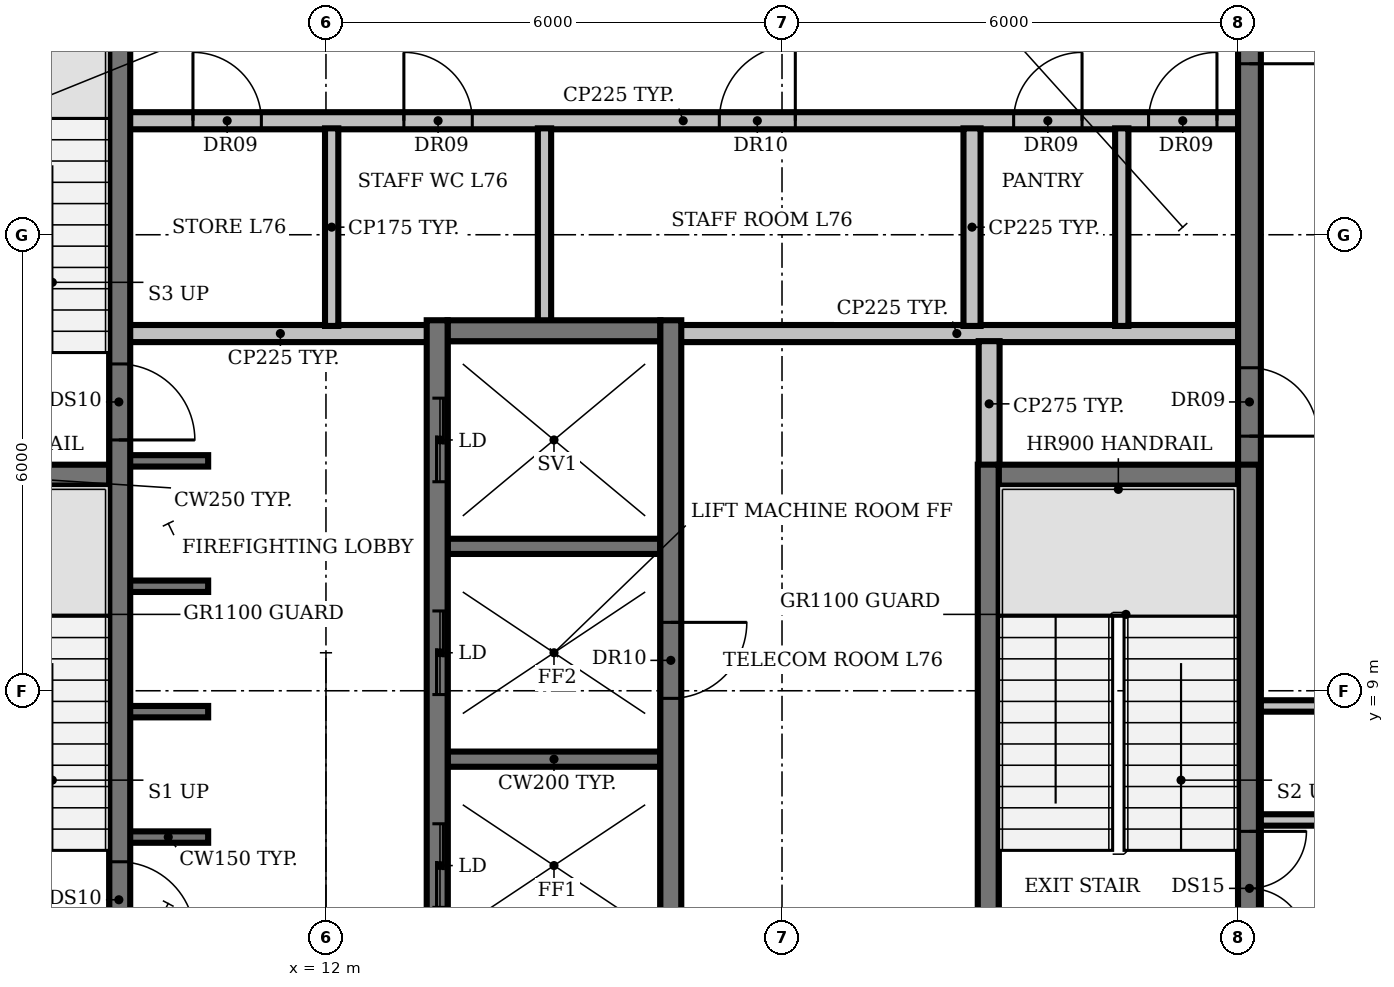
"""IFC4 building model, lengths in metres.
Left out: names, types, materials, properties, quantities, classifications, styles, units other than length and angle.
Written with IfcOpenShell. Run it as: python <this file> out.ifc"""

import sys

from ifc_helpers import new_model, si_unit, direction, frame, frame_2d, origin, place, context, subcontext, project, spatial, rectangle, extrude, element, fill, save


model = new_model("IFC4")
c1 = context("Model", 3, precision=1e-05, world=origin(), true_north=direction((0.0, 1.0)))
c2 = subcontext(c1, "Body", "Model", "MODEL_VIEW")
j1 = project(units=[si_unit("LENGTHUNIT", "METRE"), si_unit("PLANEANGLEUNIT", "RADIAN")], contexts=[c1])
p1 = place(None, origin())
s1 = spatial("IfcSite", under=j1, at=p1, CompositionType="ELEMENT")
p2 = place(p1, origin())
s2 = spatial("IfcBuilding", under=s1, at=p2, CompositionType="ELEMENT")
p3 = place(p2, frame((0.0, 0.0, 339.8)))
s3 = spatial("IfcBuildingStorey", under=s2, at=p3, CompositionType="ELEMENT", Elevation=339.8)
p4 = place(p3, frame((9.4, 7.075, 0.0), z_axis=(0.0, 0.0, 1.0), x_axis=(1.0, 0.0, 0.0)))
e1 = element("IfcWall", 1, at=p4, inside=s3, PredefinedType="SHEAR", context=c2, shape_type="SweptSolid", body=[
    extrude(rectangle(XDim=1.05, YDim=0.15, at=frame_2d((0.525, 0.0))), origin(), (0.0, 0.0, 1.0), 3.9),
])
p5 = place(p3, frame((13.6, 8.1, 0.0), z_axis=(0.0, 0.0, 1.0), x_axis=(1.0, 0.0, 0.0)))
e2 = element("IfcWall", 2, at=p5, inside=s3, PredefinedType="SHEAR", context=c2, shape_type="SweptSolid", body=[
    extrude(rectangle(XDim=2.8, YDim=0.2, at=frame_2d((1.4, 0.0))), origin(), (0.0, 0.0, 1.0), 3.9),
])
for number, where, z_axis, x_axis in (
    (3, (9.4, 8.725, 0.0), (0.0, 0.0, 1.0), (1.0, 0.0, 0.0)),
    (4, (9.4, 10.375, 0.0), (0.0, 0.0, 1.0), (1.0, 0.0, 0.0)),
):
    element("IfcWall", number, at=place(p3, frame(where, z_axis=z_axis, x_axis=x_axis)), inside=s3, PredefinedType="SHEAR", context=c2, shape_type="SweptSolid", body=[
        extrude(rectangle(XDim=1.05, YDim=0.15, at=frame_2d((0.525, 0.0))), origin(), (0.0, 0.0, 1.0), 3.9),
    ])
p6 = place(p3, frame((13.6, 10.9, 0.0), z_axis=(0.0, 0.0, 1.0), x_axis=(1.0, 0.0, 0.0)))
e5 = element("IfcWall", 5, at=p6, inside=s3, PredefinedType="SHEAR", context=c2, shape_type="SweptSolid", body=[
    extrude(rectangle(XDim=2.8, YDim=0.2, at=frame_2d((1.4, 0.0))), origin(), (0.0, 0.0, 1.0), 3.9),
])
for number, where, z_axis, x_axis in (
    (6, (6.0, 11.825, 0.0), (0.0, 0.0, 1.0), (1.0, 0.0, 0.0)),
    (7, (20.85, 11.825, 0.0), (0.0, 0.0, 1.0), (1.0, 0.0, 0.0)),
):
    element("IfcWall", number, at=place(p3, frame(where, z_axis=z_axis, x_axis=x_axis)), inside=s3, PredefinedType="SHEAR", context=c2, shape_type="SweptSolid", body=[
        extrude(rectangle(XDim=3.15, YDim=0.25, at=frame_2d((1.575, 0.0))), origin(), (0.0, 0.0, 1.0), 3.9),
    ])
p7 = place(p3, frame((9.4, 12.025, 0.0), z_axis=(0.0, 0.0, 1.0), x_axis=(1.0, 0.0, 0.0)))
e8 = element("IfcWall", 8, at=p7, inside=s3, PredefinedType="SHEAR", context=c2, shape_type="SweptSolid", body=[
    extrude(rectangle(XDim=1.05, YDim=0.15, at=frame_2d((0.525, 0.0))), origin(), (0.0, 0.0, 1.0), 3.9),
])
p8 = place(p3, frame((9.4, 13.7, 0.0), z_axis=(0.0, 0.0, 1.0), x_axis=(1.0, 0.0, 0.0)))
e9 = element("IfcWall", 9, at=p8, inside=s3, PredefinedType="PARTITIONING", context=c2, shape_type="SweptSolid", body=[
    extrude(rectangle(XDim=4.0, YDim=0.225, at=frame_2d((2.0, 0.0))), origin(), (0.0, 0.0, 1.0), 3.9),
])
p9 = place(p3, frame((13.6, 13.7, 0.0), z_axis=(0.0, 0.0, 1.0), x_axis=(1.0, 0.0, 0.0)))
e10 = element("IfcWall", 10, at=p9, inside=s3, PredefinedType="SHEAR", context=c2, shape_type="SweptSolid", body=[
    extrude(rectangle(XDim=2.8, YDim=0.2, at=frame_2d((1.4, 0.0))), origin(), (0.0, 0.0, 1.0), 3.9),
])
p10 = place(p3, frame((16.6, 13.7, 0.0), z_axis=(0.0, 0.0, 1.0), x_axis=(1.0, 0.0, 0.0)))
e11 = element("IfcWall", 11, at=p10, inside=s3, PredefinedType="PARTITIONING", context=c2, shape_type="SweptSolid", body=[
    extrude(rectangle(XDim=7.4, YDim=0.225, at=frame_2d((3.7, 0.0))), origin(), (0.0, 0.0, 1.0), 3.9),
])
p11 = place(p3, frame((9.4, 16.5, 0.0), z_axis=(0.0, 0.0, 1.0), x_axis=(1.0, 0.0, 0.0)))
e12 = element("IfcWall", 12, at=p11, inside=s3, PredefinedType="PARTITIONING", context=c2, shape_type="SweptSolid", body=[
    extrude(rectangle(XDim=14.6, YDim=0.225, at=frame_2d((7.3, 0.0))), origin(), (0.0, 0.0, 1.0), 3.9),
])
p12 = place(p11, frame((0.85, 0.0, 0.0)))
e13 = element("IfcOpeningElement", 13, at=p12, cuts=e12, PredefinedType="OPENING", context=c2, shape_type="SweptSolid", body=[
    extrude(rectangle(XDim=0.9, YDim=2.1, at=frame_2d((0.45, 1.05))), frame((0.0, 0.123, 0.0), z_axis=(0.0, -1.0, 0.0), x_axis=(1.0, 0.0, 0.0)), (0.0, 0.0, 1.0), 0.245),
])
p13 = place(p11, frame((3.625, 0.0, 0.0)))
e14 = element("IfcOpeningElement", 14, at=p13, cuts=e12, PredefinedType="OPENING", context=c2, shape_type="SweptSolid", body=[
    extrude(rectangle(XDim=0.9, YDim=2.1, at=frame_2d((0.45, 1.05))), frame((0.0, 0.123, 0.0), z_axis=(0.0, -1.0, 0.0), x_axis=(1.0, 0.0, 0.0)), (0.0, 0.0, 1.0), 0.245),
])
p14 = place(p11, frame((7.775, 0.0, 0.0)))
e15 = element("IfcOpeningElement", 15, at=p14, cuts=e12, PredefinedType="OPENING", context=c2, shape_type="SweptSolid", body=[
    extrude(rectangle(XDim=1.0, YDim=2.1, at=frame_2d((0.5, 1.05))), frame((0.0, 0.123, 0.0), z_axis=(0.0, -1.0, 0.0), x_axis=(1.0, 0.0, 0.0)), (0.0, 0.0, 1.0), 0.245),
])
p15 = place(p11, frame((11.647, 0.0, 0.0)))
e16 = element("IfcOpeningElement", 16, at=p15, cuts=e12, PredefinedType="OPENING", context=c2, shape_type="SweptSolid", body=[
    extrude(rectangle(XDim=0.9, YDim=2.1, at=frame_2d((0.45, 1.05))), frame((0.0, 0.123, 0.0), z_axis=(0.0, -1.0, 0.0), x_axis=(1.0, 0.0, 0.0)), (0.0, 0.0, 1.0), 0.245),
])
p16 = place(p11, frame((13.423, 0.0, 0.0)))
e17 = element("IfcOpeningElement", 17, at=p16, cuts=e12, PredefinedType="OPENING", context=c2, shape_type="SweptSolid", body=[
    extrude(rectangle(XDim=0.9, YDim=2.1, at=frame_2d((0.45, 1.05))), frame((0.0, 0.123, 0.0), z_axis=(0.0, -1.0, 0.0), x_axis=(1.0, 0.0, 0.0)), (0.0, 0.0, 1.0), 0.245),
])
p17 = place(p3, frame((9.275, 11.825, 0.0), z_axis=(0.0, 0.0, 1.0), x_axis=(0.0, -1.0, 0.0)))
e18 = element("IfcWall", 18, at=p17, inside=s3, PredefinedType="SHEAR", context=c2, shape_type="SweptSolid", body=[
    extrude(rectangle(XDim=6.425, YDim=0.25, at=frame_2d((3.212, 0.0))), origin(), (0.0, 0.0, 1.0), 3.9),
])
p18 = place(p17, frame((5.075, 0.0, 0.0)))
e19 = element("IfcOpeningElement", 19, at=p18, cuts=e18, PredefinedType="OPENING", context=c2, shape_type="SweptSolid", body=[
    extrude(rectangle(XDim=1.0, YDim=2.1, at=frame_2d((0.5, 1.05))), frame((0.0, 0.135, 0.0), z_axis=(0.0, -1.0, 0.0), x_axis=(1.0, 0.0, 0.0)), (0.0, 0.0, 1.0), 0.27),
])
p19 = place(p3, frame((9.275, 18.375, 0.0), z_axis=(0.0, 0.0, 1.0), x_axis=(0.0, -1.0, 0.0)))
e20 = element("IfcWall", 20, at=p19, inside=s3, PredefinedType="SHEAR", context=c2, shape_type="SweptSolid", body=[
    extrude(rectangle(XDim=6.55, YDim=0.25, at=frame_2d((3.275, 0.0))), origin(), (0.0, 0.0, 1.0), 3.9),
])
p20 = place(p19, frame((5.075, 0.0, 0.0)))
e21 = element("IfcOpeningElement", 21, at=p20, cuts=e20, PredefinedType="OPENING", context=c2, shape_type="SweptSolid", body=[
    extrude(rectangle(XDim=1.0, YDim=2.1, at=frame_2d((0.5, 1.05))), frame((0.0, 0.135, 0.0), z_axis=(0.0, -1.0, 0.0), x_axis=(1.0, 0.0, 0.0)), (0.0, 0.0, 1.0), 0.27),
])
p21 = place(p3, frame((12.075, 13.8, 0.0), z_axis=(0.0, 0.0, 1.0), x_axis=(0.0, 1.0, 0.0)))
e22 = element("IfcWall", 22, at=p21, inside=s3, PredefinedType="PARTITIONING", context=c2, shape_type="SweptSolid", body=[
    extrude(rectangle(XDim=2.6, YDim=0.175, at=frame_2d((1.3, 0.0))), origin(), (0.0, 0.0, 1.0), 3.9),
])
p22 = place(p3, frame((13.5, 5.4, 0.0), z_axis=(0.0, 0.0, 1.0), x_axis=(0.0, 1.0, 0.0)))
e23 = element("IfcWall", 23, at=p22, inside=s3, PredefinedType="SHEAR", context=c2, shape_type="SweptSolid", body=[
    extrude(rectangle(XDim=8.2, YDim=0.2, at=frame_2d((4.1, 0.0))), origin(), (0.0, 0.0, 1.0), 3.9),
])
p23 = place(p22, frame((0.75, 0.0, 0.0)))
e24 = element("IfcOpeningElement", 24, at=p23, cuts=e23, PredefinedType="OPENING", context=c2, shape_type="SweptSolid", body=[
    extrude(rectangle(XDim=1.1, YDim=2.1, at=frame_2d((0.55, 1.05))), frame((0.0, 0.11, 0.0), z_axis=(0.0, -1.0, 0.0), x_axis=(1.0, 0.0, 0.0)), (0.0, 0.0, 1.0), 0.22),
])
p24 = place(p22, frame((3.55, 0.0, 0.0)))
e25 = element("IfcOpeningElement", 25, at=p24, cuts=e23, PredefinedType="OPENING", context=c2, shape_type="SweptSolid", body=[
    extrude(rectangle(XDim=1.1, YDim=2.1, at=frame_2d((0.55, 1.05))), frame((0.0, 0.11, 0.0), z_axis=(0.0, -1.0, 0.0), x_axis=(1.0, 0.0, 0.0)), (0.0, 0.0, 1.0), 0.22),
])
p25 = place(p22, frame((6.35, 0.0, 0.0)))
e26 = element("IfcOpeningElement", 26, at=p25, cuts=e23, PredefinedType="OPENING", context=c2, shape_type="SweptSolid", body=[
    extrude(rectangle(XDim=1.1, YDim=2.1, at=frame_2d((0.55, 1.05))), frame((0.0, 0.11, 0.0), z_axis=(0.0, -1.0, 0.0), x_axis=(1.0, 0.0, 0.0)), (0.0, 0.0, 1.0), 0.22),
])
p26 = place(p3, frame((14.875, 13.8, 0.0), z_axis=(0.0, 0.0, 1.0), x_axis=(0.0, 1.0, 0.0)))
e27 = element("IfcWall", 27, at=p26, inside=s3, PredefinedType="PARTITIONING", context=c2, shape_type="SweptSolid", body=[
    extrude(rectangle(XDim=2.6, YDim=0.175, at=frame_2d((1.3, 0.0))), origin(), (0.0, 0.0, 1.0), 3.9),
])
p27 = place(p3, frame((16.5, 5.4, 0.0), z_axis=(0.0, 0.0, 1.0), x_axis=(0.0, 1.0, 0.0)))
e28 = element("IfcWall", 28, at=p27, inside=s3, PredefinedType="SHEAR", context=c2, shape_type="SweptSolid", body=[
    extrude(rectangle(XDim=8.2, YDim=0.2, at=frame_2d((4.1, 0.0))), origin(), (0.0, 0.0, 1.0), 3.9),
])
p28 = place(p3, frame((20.5, 13.8, 0.0), z_axis=(0.0, 0.0, 1.0), x_axis=(0.0, 1.0, 0.0)))
e29 = element("IfcWall", 29, at=p28, inside=s3, PredefinedType="PARTITIONING", context=c2, shape_type="SweptSolid", body=[
    extrude(rectangle(XDim=2.6, YDim=0.225, at=frame_2d((1.3, 0.0))), origin(), (0.0, 0.0, 1.0), 3.9),
])
p29 = place(p3, frame((20.725, 5.4, 0.0), z_axis=(0.0, 0.0, 1.0), x_axis=(0.0, 1.0, 0.0)))
e30 = element("IfcWall", 30, at=p29, inside=s3, PredefinedType="SHEAR", context=c2, shape_type="SweptSolid", body=[
    extrude(rectangle(XDim=6.3, YDim=0.25, at=frame_2d((3.15, 0.0))), origin(), (0.0, 0.0, 1.0), 3.9),
])
p30 = place(p3, frame((20.725, 11.95, 0.0), z_axis=(0.0, 0.0, 1.0), x_axis=(0.0, 1.0, 0.0)))
e31 = element("IfcWall", 31, at=p30, inside=s3, PredefinedType="PARTITIONING", context=c2, shape_type="SweptSolid", body=[
    extrude(rectangle(XDim=1.65, YDim=0.275, at=frame_2d((0.825, 0.0))), origin(), (0.0, 0.0, 1.0), 3.9),
])
p31 = place(p3, frame((22.47, 13.8, 0.0), z_axis=(0.0, 0.0, 1.0), x_axis=(0.0, 1.0, 0.0)))
e32 = element("IfcWall", 32, at=p31, inside=s3, PredefinedType="PARTITIONING", context=c2, shape_type="SweptSolid", body=[
    extrude(rectangle(XDim=2.6, YDim=0.175, at=frame_2d((1.3, 0.0))), origin(), (0.0, 0.0, 1.0), 3.9),
])
p32 = place(p3, frame((24.15, 25.705, 0.0), z_axis=(0.0, 0.0, 1.0), x_axis=(0.0, -1.0, 0.0)))
e33 = element("IfcWall", 33, at=p32, inside=s3, PredefinedType="SHEAR", context=c2, shape_type="SweptSolid", body=[
    extrude(rectangle(XDim=20.605, YDim=0.3, at=frame_2d((10.302, 0.0))), origin(), (0.0, 0.0, 1.0), 3.9),
])
p33 = place(p32, frame((18.555, 0.0, 0.0)))
e34 = element("IfcOpeningElement", 34, at=p33, cuts=e33, PredefinedType="OPENING", context=c2, shape_type="SweptSolid", body=[
    extrude(rectangle(XDim=1.5, YDim=2.1, at=frame_2d((0.75, 1.05))), frame((0.0, 0.16, 0.0), z_axis=(0.0, -1.0, 0.0), x_axis=(1.0, 0.0, 0.0)), (0.0, 0.0, 1.0), 0.32),
])
p34 = place(p32, frame((12.455, 0.0, 0.0)))
e35 = element("IfcOpeningElement", 35, at=p34, cuts=e33, PredefinedType="OPENING", context=c2, shape_type="SweptSolid", body=[
    extrude(rectangle(XDim=0.9, YDim=2.1, at=frame_2d((0.45, 1.05))), frame((0.0, 0.16, 0.0), z_axis=(0.0, -1.0, 0.0), x_axis=(1.0, 0.0, 0.0)), (0.0, 0.0, 1.0), 0.32),
])
p35 = place(p32, frame((6.455, 0.0, 0.0)))
e36 = element("IfcOpeningElement", 36, at=p35, cuts=e33, PredefinedType="OPENING", context=c2, shape_type="SweptSolid", body=[
    extrude(rectangle(XDim=2.0, YDim=2.1, at=frame_2d((1.0, 1.05))), frame((0.0, 0.16, 0.0), z_axis=(0.0, -1.0, 0.0), x_axis=(1.0, 0.0, 0.0)), (0.0, 0.0, 1.0), 0.32),
])
for number, where, z_axis, x_axis in (
    (37, (6.0, 11.837, 4.2), (0.0, 0.0, 1.0), (1.0, 0.0, 0.0)),
    (38, (20.85, 11.837, 4.2), (0.0, 0.0, 1.0), (1.0, 0.0, 0.0)),
):
    element("IfcWall", number, at=place(p3, frame(where, z_axis=z_axis, x_axis=x_axis)), inside=s3, PredefinedType="SHEAR", context=c2, shape_type="SweptSolid", body=[
        extrude(rectangle(XDim=3.15, YDim=0.275, at=frame_2d((1.575, 0.0))), origin(), (0.0, 0.0, 1.0), 3.0),
    ])
p36 = place(p3, frame((13.6, 13.737, 4.2), z_axis=(0.0, 0.0, 1.0), x_axis=(1.0, 0.0, 0.0)))
e39 = element("IfcWall", 39, at=p36, inside=s3, PredefinedType="SHEAR", context=c2, shape_type="SweptSolid", body=[
    extrude(rectangle(XDim=2.8, YDim=0.275, at=frame_2d((1.4, 0.0))), origin(), (0.0, 0.0, 1.0), 3.0),
])
p37 = place(p3, frame((9.287, 5.125, 4.2), z_axis=(0.0, 0.0, 1.0), x_axis=(0.0, 1.0, 0.0)))
e40 = element("IfcWall", 40, at=p37, inside=s3, PredefinedType="SHEAR", context=c2, shape_type="SweptSolid", body=[
    extrude(rectangle(XDim=19.95, YDim=0.275, at=frame_2d((9.975, 0.0))), origin(), (0.0, 0.0, 1.0), 3.0),
])
p38 = place(p3, frame((13.463, 5.125, 4.2), z_axis=(0.0, 0.0, 1.0), x_axis=(0.0, 1.0, 0.0)))
e41 = element("IfcWall", 41, at=p38, inside=s3, PredefinedType="SHEAR", context=c2, shape_type="SweptSolid", body=[
    extrude(rectangle(XDim=8.75, YDim=0.275, at=frame_2d((4.375, 0.0))), origin(), (0.0, 0.0, 1.0), 3.0),
])
p39 = place(p3, frame((16.537, 13.875, 4.2), z_axis=(0.0, 0.0, 1.0), x_axis=(0.0, -1.0, 0.0)))
e42 = element("IfcWall", 42, at=p39, inside=s3, PredefinedType="SHEAR", context=c2, shape_type="SweptSolid", body=[
    extrude(rectangle(XDim=8.75, YDim=0.275, at=frame_2d((4.375, 0.0))), origin(), (0.0, 0.0, 1.0), 3.0),
])
p40 = place(p39, frame((3.975, 0.0, 0.0)))
e43 = element("IfcOpeningElement", 43, at=p40, cuts=e42, PredefinedType="OPENING", context=c2, shape_type="SweptSolid", body=[
    extrude(rectangle(XDim=1.0, YDim=2.1, at=frame_2d((0.5, 1.05))), frame((0.0, 0.147, 0.0), z_axis=(0.0, -1.0, 0.0), x_axis=(1.0, 0.0, 0.0)), (0.0, 0.0, 1.0), 0.295),
])
for number, where, z_axis, x_axis in (
    (44, (20.713, 5.125, 4.2), (0.0, 0.0, 1.0), (0.0, 1.0, 0.0)),
    (45, (24.137, 5.125, 4.2), (0.0, 0.0, 1.0), (0.0, 1.0, 0.0)),
):
    element("IfcWall", number, at=place(p3, frame(where, z_axis=z_axis, x_axis=x_axis)), inside=s3, PredefinedType="SHEAR", context=c2, shape_type="SweptSolid", body=[
        extrude(rectangle(XDim=6.85, YDim=0.275, at=frame_2d((3.425, 0.0))), origin(), (0.0, 0.0, 1.0), 3.0),
    ])
for number, where, z_axis, x_axis in (
    (46, (24.3, 7.3, 0.0), (0.0, 0.0, 1.0), (1.0, 0.0, 0.0)),
    (47, (24.3, 8.8, 0.0), (0.0, 0.0, 1.0), (1.0, 0.0, 0.0)),
):
    element("IfcWall", number, at=place(p3, frame(where, z_axis=z_axis, x_axis=x_axis)), inside=s3, PredefinedType="PARTITIONING", context=c2, shape_type="SweptSolid", body=[
        extrude(rectangle(XDim=1.05, YDim=0.15, at=frame_2d((0.525, 0.0))), origin(), (0.0, 0.0, 1.0), 2.95),
    ])
p41 = place(p12, origin())
e48 = element("IfcDoor", 48, at=p41, inside=s3, OperationType="SINGLE_SWING_LEFT", PredefinedType="DOOR", context=c2, shape_type="SweptSolid", body=[
    extrude(rectangle(XDim=0.9, YDim=2.1, at=frame_2d((0.45, 1.05))), frame((0.0, 0.025, 0.0), z_axis=(0.0, -1.0, 0.0), x_axis=(1.0, 0.0, 0.0)), (0.0, 0.0, 1.0), 0.05),
])
fill(e13, e48)
p42 = place(p13, origin())
e49 = element("IfcDoor", 49, at=p42, inside=s3, OperationType="SINGLE_SWING_LEFT", PredefinedType="DOOR", context=c2, shape_type="SweptSolid", body=[
    extrude(rectangle(XDim=0.9, YDim=2.1, at=frame_2d((0.45, 1.05))), frame((0.0, 0.025, 0.0), z_axis=(0.0, -1.0, 0.0), x_axis=(1.0, 0.0, 0.0)), (0.0, 0.0, 1.0), 0.05),
])
fill(e14, e49)
p43 = place(p14, origin())
e50 = element("IfcDoor", 50, at=p43, inside=s3, OperationType="SINGLE_SWING_RIGHT", PredefinedType="DOOR", context=c2, shape_type="SweptSolid", body=[
    extrude(rectangle(XDim=1.0, YDim=2.1, at=frame_2d((0.5, 1.05))), frame((0.0, 0.025, 0.0), z_axis=(0.0, -1.0, 0.0), x_axis=(1.0, 0.0, 0.0)), (0.0, 0.0, 1.0), 0.05),
])
fill(e15, e50)
p44 = place(p15, origin())
e51 = element("IfcDoor", 51, at=p44, inside=s3, OperationType="SINGLE_SWING_RIGHT", PredefinedType="DOOR", context=c2, shape_type="SweptSolid", body=[
    extrude(rectangle(XDim=0.9, YDim=2.1, at=frame_2d((0.45, 1.05))), frame((0.0, 0.025, 0.0), z_axis=(0.0, -1.0, 0.0), x_axis=(1.0, 0.0, 0.0)), (0.0, 0.0, 1.0), 0.05),
])
fill(e16, e51)
p45 = place(p16, origin())
e52 = element("IfcDoor", 52, at=p45, inside=s3, OperationType="SINGLE_SWING_RIGHT", PredefinedType="DOOR", context=c2, shape_type="SweptSolid", body=[
    extrude(rectangle(XDim=0.9, YDim=2.1, at=frame_2d((0.45, 1.05))), frame((0.0, 0.025, 0.0), z_axis=(0.0, -1.0, 0.0), x_axis=(1.0, 0.0, 0.0)), (0.0, 0.0, 1.0), 0.05),
])
fill(e17, e52)
p46 = place(p18, origin())
e53 = element("IfcDoor", 53, at=p46, inside=s3, OperationType="SINGLE_SWING_RIGHT", PredefinedType="DOOR", context=c2, shape_type="SweptSolid", body=[
    extrude(rectangle(XDim=1.0, YDim=2.1, at=frame_2d((0.5, 1.05))), frame((0.0, 0.025, 0.0), z_axis=(0.0, -1.0, 0.0), x_axis=(1.0, 0.0, 0.0)), (0.0, 0.0, 1.0), 0.05),
])
fill(e19, e53)
p47 = place(p20, origin())
e54 = element("IfcDoor", 54, at=p47, inside=s3, OperationType="SINGLE_SWING_RIGHT", PredefinedType="DOOR", context=c2, shape_type="SweptSolid", body=[
    extrude(rectangle(XDim=1.0, YDim=2.1, at=frame_2d((0.5, 1.05))), frame((0.0, 0.025, 0.0), z_axis=(0.0, -1.0, 0.0), x_axis=(1.0, 0.0, 0.0)), (0.0, 0.0, 1.0), 0.05),
])
fill(e21, e54)
p48 = place(p23, origin())
e55 = element("IfcDoor", 55, at=p48, inside=s3, OperationType="DOUBLE_DOOR_SLIDING", PredefinedType="DOOR", context=c2, shape_type="SweptSolid", body=[
    extrude(rectangle(XDim=1.1, YDim=2.1, at=frame_2d((0.55, 1.05))), frame((0.0, 0.025, 0.0), z_axis=(0.0, -1.0, 0.0), x_axis=(1.0, 0.0, 0.0)), (0.0, 0.0, 1.0), 0.05),
])
fill(e24, e55)
p49 = place(p24, origin())
e56 = element("IfcDoor", 56, at=p49, inside=s3, OperationType="DOUBLE_DOOR_SLIDING", PredefinedType="DOOR", context=c2, shape_type="SweptSolid", body=[
    extrude(rectangle(XDim=1.1, YDim=2.1, at=frame_2d((0.55, 1.05))), frame((0.0, 0.025, 0.0), z_axis=(0.0, -1.0, 0.0), x_axis=(1.0, 0.0, 0.0)), (0.0, 0.0, 1.0), 0.05),
])
fill(e25, e56)
p50 = place(p25, origin())
e57 = element("IfcDoor", 57, at=p50, inside=s3, OperationType="DOUBLE_DOOR_SLIDING", PredefinedType="DOOR", context=c2, shape_type="SweptSolid", body=[
    extrude(rectangle(XDim=1.1, YDim=2.1, at=frame_2d((0.55, 1.05))), frame((0.0, 0.025, 0.0), z_axis=(0.0, -1.0, 0.0), x_axis=(1.0, 0.0, 0.0)), (0.0, 0.0, 1.0), 0.05),
])
fill(e26, e57)
p51 = place(p33, origin())
e58 = element("IfcDoor", 58, at=p51, inside=s3, OperationType="DOUBLE_DOOR_SINGLE_SWING", PredefinedType="DOOR", context=c2, shape_type="SweptSolid", body=[
    extrude(rectangle(XDim=1.5, YDim=2.1, at=frame_2d((0.75, 1.05))), frame((0.0, 0.025, 0.0), z_axis=(0.0, -1.0, 0.0), x_axis=(1.0, 0.0, 0.0)), (0.0, 0.0, 1.0), 0.05),
])
fill(e34, e58)
p52 = place(p34, origin())
e59 = element("IfcDoor", 59, at=p52, inside=s3, OperationType="SINGLE_SWING_RIGHT", PredefinedType="DOOR", context=c2, shape_type="SweptSolid", body=[
    extrude(rectangle(XDim=0.9, YDim=2.1, at=frame_2d((0.45, 1.05))), frame((0.0, 0.025, 0.0), z_axis=(0.0, -1.0, 0.0), x_axis=(1.0, 0.0, 0.0)), (0.0, 0.0, 1.0), 0.05),
])
fill(e35, e59)
p53 = place(p35, origin())
e60 = element("IfcDoor", 60, at=p53, inside=s3, OperationType="DOUBLE_DOOR_SINGLE_SWING", PredefinedType="DOOR", context=c2, shape_type="SweptSolid", body=[
    extrude(rectangle(XDim=2.0, YDim=2.1, at=frame_2d((1.0, 1.05))), frame((0.0, 0.025, 0.0), z_axis=(0.0, -1.0, 0.0), x_axis=(1.0, 0.0, 0.0)), (0.0, 0.0, 1.0), 0.05),
])
fill(e36, e60)
p54 = place(p40, origin())
e61 = element("IfcDoor", 61, at=p54, inside=s3, OperationType="SINGLE_SWING_LEFT", PredefinedType="DOOR", context=c2, shape_type="SweptSolid", body=[
    extrude(rectangle(XDim=1.0, YDim=2.1, at=frame_2d((0.5, 1.05))), frame((0.0, 0.025, 0.0), z_axis=(0.0, -1.0, 0.0), x_axis=(1.0, 0.0, 0.0)), (0.0, 0.0, 1.0), 0.05),
])
fill(e43, e61)
save(model, sys.argv[1])
